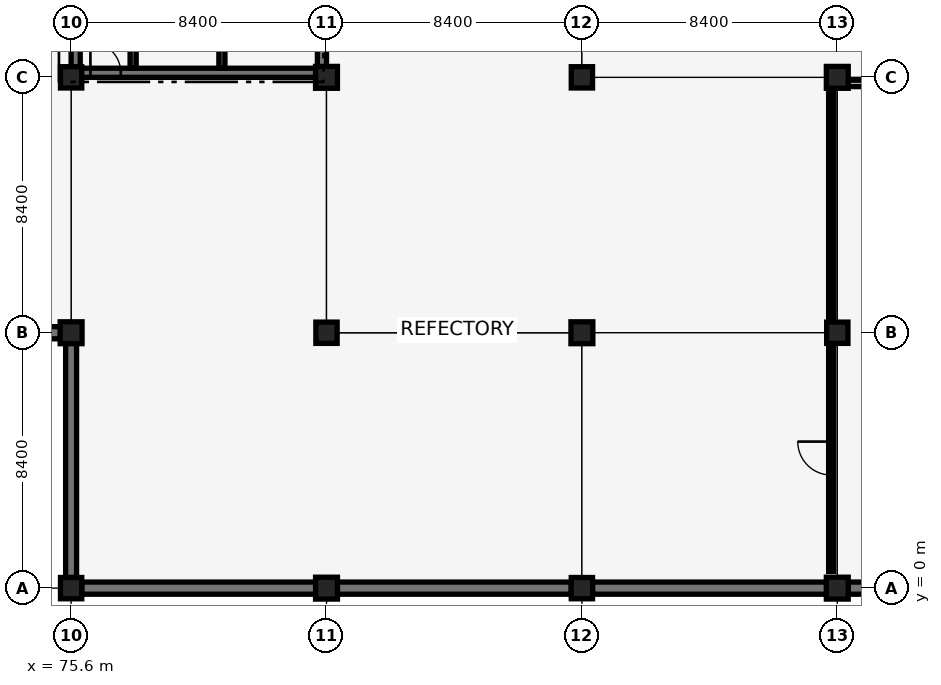
"""IFC4 building model, lengths in metres.
Left out: names, types, materials, properties, quantities, classifications, styles, units other than length and angle.
Written with IfcOpenShell. Run it as: python <this file> out.ifc"""

import sys

from ifc_helpers import new_model, si_unit, direction, frame, frame_2d, origin, origin_2d, place, context, subcontext, project, spatial, rectangle, extrude, element, fill, save


model = new_model("IFC4")
c1 = context("Model", 3, precision=1e-05, world=origin(), true_north=direction((0.0, 1.0)))
c2 = subcontext(c1, "Body", "Model", "MODEL_VIEW")
j1 = project(units=[si_unit("LENGTHUNIT", "METRE"), si_unit("PLANEANGLEUNIT", "RADIAN")], contexts=[c1])
p1 = place(None, origin())
s1 = spatial("IfcSite", under=j1, at=p1, CompositionType="ELEMENT")
p2 = place(p1, origin())
s2 = spatial("IfcBuilding", under=s1, at=p2, CompositionType="ELEMENT")
p3 = place(p2, frame((0.0, 0.0, -4.42)))
s3 = spatial("IfcBuildingStorey", under=s2, at=p3, CompositionType="ELEMENT", Elevation=-4.42)
for number, where, z_axis, x_axis in (
    (1, (67.55, 8.4, 0.0), (0.0, 0.0, 1.0), (1.0, 0.0, 0.0)),
    (2, (75.95, 0.0, 0.0), (0.0, 0.0, 1.0), (1.0, 0.0, 0.0)),
):
    element("IfcWall", number, at=place(p3, frame(where, z_axis=z_axis, x_axis=x_axis)), inside=s3, PredefinedType="USERDEFINED", context=c2, shape_type="SweptSolid", body=[
        extrude(rectangle(XDim=7.7, YDim=0.4, at=frame_2d((3.85, 0.0))), origin(), (0.0, 0.0, 1.0), 4.12),
    ])
p4 = place(p3, frame((75.6, 0.35, 0.0), z_axis=(0.0, 0.0, 1.0), x_axis=(0.0, 1.0, 0.0)))
e3 = element("IfcWall", 3, at=p4, inside=s3, PredefinedType="USERDEFINED", context=c2, shape_type="SweptSolid", body=[
    extrude(rectangle(XDim=7.7, YDim=0.36, at=frame_2d((3.85, 0.0))), origin(), (0.0, 0.0, 1.0), 4.12),
])
for number, where, z_axis, x_axis in (
    (4, (84.35, 0.0, 0.0), (0.0, 0.0, 1.0), (1.0, 0.0, 0.0)),
    (5, (92.75, 0.0, 0.0), (0.0, 0.0, 1.0), (1.0, 0.0, 0.0)),
):
    element("IfcWall", number, at=place(p3, frame(where, z_axis=z_axis, x_axis=x_axis)), inside=s3, PredefinedType="USERDEFINED", context=c2, shape_type="SweptSolid", body=[
        extrude(rectangle(XDim=7.7, YDim=0.4, at=frame_2d((3.85, 0.0))), origin(), (0.0, 0.0, 1.0), 4.12),
    ])
p5 = place(p3, frame((101.15, 0.0, 0.0), z_axis=(0.0, 0.0, 1.0), x_axis=(1.0, 0.0, 0.0)))
e6 = element("IfcWall", 6, at=p5, inside=s3, PredefinedType="USERDEFINED", context=c2, shape_type="SweptSolid", body=[
    extrude(rectangle(XDim=7.7, YDim=0.4, at=frame_2d((3.85, 0.0))), origin(), (0.0, 0.0, 1.0), 4.12),
])
p6 = place(p3, frame((75.75, 16.95, 0.0), z_axis=(0.0, 0.0, 1.0), x_axis=(1.0, 0.0, 0.0)))
e7 = element("IfcWall", 7, at=p6, inside=s3, PredefinedType="SHEAR", context=c2, shape_type="SweptSolid", body=[
    extrude(rectangle(XDim=8.1, YDim=0.3, at=frame_2d((4.05, 0.0))), origin(), (0.0, 0.0, 1.0), 4.12),
])
p7 = place(p6, frame((0.485, 0.0, 0.0)))
e8 = element("IfcOpeningElement", 8, at=p7, cuts=e7, PredefinedType="OPENING", context=c2, shape_type="SweptSolid", body=[
    extrude(rectangle(XDim=1.0, YDim=2.15, at=frame_2d((0.5, 1.075))), frame((0.0, 0.16, 0.0), z_axis=(0.0, -1.0, 0.0), x_axis=(1.0, 0.0, 0.0)), (0.0, 0.0, 1.0), 0.32),
])
p8 = place(p3, frame((75.75, 16.95, 0.0), z_axis=(0.0, 0.0, 1.0), x_axis=(0.0, 1.0, 0.0)))
e9 = element("IfcWall", 9, at=p8, inside=s3, PredefinedType="SHEAR", context=c2, shape_type="SweptSolid", body=[
    extrude(rectangle(XDim=8.1, YDim=0.3, at=frame_2d((4.05, 0.0))), origin(), (0.0, 0.0, 1.0), 4.12),
])
p9 = place(p3, frame((83.85, 16.95, 0.0), z_axis=(0.0, 0.0, 1.0), x_axis=(0.0, 1.0, 0.0)))
e10 = element("IfcWall", 10, at=p9, inside=s3, PredefinedType="SHEAR", context=c2, shape_type="SweptSolid", body=[
    extrude(rectangle(XDim=8.1, YDim=0.3, at=frame_2d((4.05, 0.0))), origin(), (0.0, 0.0, 1.0), 4.12),
])
p10 = place(p9, frame((1.325, 0.0, 0.0)))
e11 = element("IfcOpeningElement", 11, at=p10, cuts=e10, PredefinedType="OPENING", context=c2, shape_type="SweptSolid", body=[
    extrude(rectangle(XDim=1.45, YDim=2.15, at=frame_2d((0.725, 1.075))), frame((0.0, 0.16, 0.0), z_axis=(0.0, -1.0, 0.0), x_axis=(1.0, 0.0, 0.0)), (0.0, 0.0, 1.0), 0.32),
])
p11 = place(p3, frame((75.6, 0.0, -0.4), z_axis=(0.0, 0.0, 1.0), x_axis=(1.0, 0.0, 0.0)))
e12 = element("IfcColumn", 12, at=p11, inside=s3, PredefinedType="COLUMN", context=c2, shape_type="SweptSolid", body=[
    extrude(rectangle(XDim=0.7, YDim=0.7, at=origin_2d()), origin(), (0.0, 0.0, 1.0), 4.52),
])
p12 = place(p3, frame((75.6, 8.4, -0.4), z_axis=(0.0, 0.0, 1.0), x_axis=(1.0, 0.0, 0.0)))
e13 = element("IfcColumn", 13, at=p12, inside=s3, PredefinedType="COLUMN", context=c2, shape_type="SweptSolid", body=[
    extrude(rectangle(XDim=0.72, YDim=0.72, at=origin_2d()), origin(), (0.0, 0.0, 1.0), 4.52),
])
p13 = place(p3, frame((75.6, 16.8, -0.4), z_axis=(0.0, 0.0, 1.0), x_axis=(1.0, 0.0, 0.0)))
e14 = element("IfcColumn", 14, at=p13, inside=s3, PredefinedType="COLUMN", context=c2, shape_type="SweptSolid", body=[
    extrude(rectangle(XDim=0.7, YDim=0.7, at=origin_2d()), origin(), (0.0, 0.0, 1.0), 4.52),
])
p14 = place(p3, frame((84.0, 0.0, -0.4), z_axis=(0.0, 0.0, 1.0), x_axis=(1.0, 0.0, 0.0)))
e15 = element("IfcColumn", 15, at=p14, inside=s3, PredefinedType="COLUMN", context=c2, shape_type="SweptSolid", body=[
    extrude(rectangle(XDim=0.72, YDim=0.72, at=origin_2d()), origin(), (0.0, 0.0, 1.0), 4.52),
])
p15 = place(p3, frame((84.0, 8.4, -0.4), z_axis=(0.0, 0.0, 1.0), x_axis=(1.0, 0.0, 0.0)))
e16 = element("IfcColumn", 16, at=p15, inside=s3, PredefinedType="COLUMN", context=c2, shape_type="SweptSolid", body=[
    extrude(rectangle(XDim=0.7, YDim=0.7, at=origin_2d()), origin(), (0.0, 0.0, 1.0), 4.52),
])
p16 = place(p3, frame((84.0, 16.8, -0.4), z_axis=(0.0, 0.0, 1.0), x_axis=(1.0, 0.0, 0.0)))
e17 = element("IfcColumn", 17, at=p16, inside=s3, PredefinedType="COLUMN", context=c2, shape_type="SweptSolid", body=[
    extrude(rectangle(XDim=0.72, YDim=0.72, at=origin_2d()), origin(), (0.0, 0.0, 1.0), 4.52),
])
p17 = place(p3, frame((92.4, 0.0, -0.4), z_axis=(0.0, 0.0, 1.0), x_axis=(1.0, 0.0, 0.0)))
e18 = element("IfcColumn", 18, at=p17, inside=s3, PredefinedType="COLUMN", context=c2, shape_type="SweptSolid", body=[
    extrude(rectangle(XDim=0.7, YDim=0.7, at=origin_2d()), origin(), (0.0, 0.0, 1.0), 4.52),
])
p18 = place(p3, frame((92.4, 8.4, -0.4), z_axis=(0.0, 0.0, 1.0), x_axis=(1.0, 0.0, 0.0)))
e19 = element("IfcColumn", 19, at=p18, inside=s3, PredefinedType="COLUMN", context=c2, shape_type="SweptSolid", body=[
    extrude(rectangle(XDim=0.72, YDim=0.72, at=origin_2d()), origin(), (0.0, 0.0, 1.0), 4.52),
])
p19 = place(p3, frame((92.4, 16.8, -0.4), z_axis=(0.0, 0.0, 1.0), x_axis=(1.0, 0.0, 0.0)))
e20 = element("IfcColumn", 20, at=p19, inside=s3, PredefinedType="COLUMN", context=c2, shape_type="SweptSolid", body=[
    extrude(rectangle(XDim=0.7, YDim=0.7, at=origin_2d()), origin(), (0.0, 0.0, 1.0), 4.52),
])
p20 = place(p3, frame((100.8, 0.0, -0.4), z_axis=(0.0, 0.0, 1.0), x_axis=(1.0, 0.0, 0.0)))
e21 = element("IfcColumn", 21, at=p20, inside=s3, PredefinedType="COLUMN", context=c2, shape_type="SweptSolid", body=[
    extrude(rectangle(XDim=0.72, YDim=0.72, at=origin_2d()), origin(), (0.0, 0.0, 1.0), 4.52),
])
p21 = place(p3, frame((100.8, 8.4, -0.4), z_axis=(0.0, 0.0, 1.0), x_axis=(1.0, 0.0, 0.0)))
e22 = element("IfcColumn", 22, at=p21, inside=s3, PredefinedType="COLUMN", context=c2, shape_type="SweptSolid", body=[
    extrude(rectangle(XDim=0.7, YDim=0.7, at=origin_2d()), origin(), (0.0, 0.0, 1.0), 4.52),
])
p22 = place(p3, frame((100.8, 16.8, -0.4), z_axis=(0.0, 0.0, 1.0), x_axis=(1.0, 0.0, 0.0)))
e23 = element("IfcColumn", 23, at=p22, inside=s3, PredefinedType="COLUMN", context=c2, shape_type="SweptSolid", body=[
    extrude(rectangle(XDim=0.72, YDim=0.72, at=origin_2d()), origin(), (0.0, 0.0, 1.0), 4.52),
])
p23 = place(p3, frame((80.56, 17.1, 0.0), z_axis=(0.0, 0.0, 1.0), x_axis=(0.0, 1.0, 0.0)))
e24 = element("IfcWall", 24, at=p23, inside=s3, PredefinedType="SHEAR", context=c2, shape_type="SweptSolid", body=[
    extrude(rectangle(XDim=3.8, YDim=0.2, at=frame_2d((1.9, 0.0))), origin(), (0.0, 0.0, 1.0), 3.24),
])
p24 = place(p23, frame((1.35, 0.0, 0.0)))
e25 = element("IfcOpeningElement", 25, at=p24, cuts=e24, PredefinedType="OPENING", context=c2, shape_type="SweptSolid", body=[
    extrude(rectangle(XDim=1.1, YDim=2.15, at=frame_2d((0.55, 1.075))), frame((0.0, 0.11, 0.0), z_axis=(0.0, -1.0, 0.0), x_axis=(1.0, 0.0, 0.0)), (0.0, 0.0, 1.0), 0.22),
])
p25 = place(p3, frame((77.64, 17.1, 0.0), z_axis=(0.0, 0.0, 1.0), x_axis=(0.0, 1.0, 0.0)))
e26 = element("IfcWall", 26, at=p25, inside=s3, PredefinedType="SHEAR", context=c2, shape_type="SweptSolid", body=[
    extrude(rectangle(XDim=3.8, YDim=0.2, at=frame_2d((1.9, 0.0))), origin(), (0.0, 0.0, 1.0), 3.24),
])
p26 = place(p3, frame((100.6, 0.55, 0.0), z_axis=(0.0, 0.0, 1.0), x_axis=(0.0, 1.0, 0.0)))
e27 = element("IfcWall", 27, at=p26, inside=s3, PredefinedType="PARTITIONING", context=c2, shape_type="SweptSolid", body=[
    extrude(rectangle(XDim=7.44, YDim=0.17, at=frame_2d((3.72, 0.0))), origin(), (0.0, 0.0, 1.0), 3.32),
])
p27 = place(p26, frame((3.17, 0.0, 0.0)))
e28 = element("IfcOpeningElement", 28, at=p27, cuts=e27, PredefinedType="OPENING", context=c2, shape_type="SweptSolid", body=[
    extrude(rectangle(XDim=1.1, YDim=2.15, at=frame_2d((0.55, 1.075))), frame((0.0, 0.095, 0.0), z_axis=(0.0, -1.0, 0.0), x_axis=(1.0, 0.0, 0.0)), (0.0, 0.0, 1.0), 0.19),
])
p28 = place(p3, frame((100.6, 8.81, 0.0), z_axis=(0.0, 0.0, 1.0), x_axis=(0.0, 1.0, 0.0)))
e29 = element("IfcWall", 29, at=p28, inside=s3, PredefinedType="PARTITIONING", context=c2, shape_type="SweptSolid", body=[
    extrude(rectangle(XDim=7.64, YDim=0.17, at=frame_2d((3.82, 0.0))), origin(), (0.0, 0.0, 1.0), 3.24),
])
p29 = place(p3, frame((101.15, 16.6, 0.0), z_axis=(0.0, 0.0, 1.0), x_axis=(1.0, 0.0, 0.0)))
e30 = element("IfcWall", 30, at=p29, inside=s3, PredefinedType="PARTITIONING", context=c2, shape_type="SweptSolid", body=[
    extrude(rectangle(XDim=7.64, YDim=0.21, at=frame_2d((3.82, 0.0))), origin(), (0.0, 0.0, 1.0), 3.24),
])
p30 = place(p29, frame((3.12, 0.0, 0.0)))
e31 = element("IfcOpeningElement", 31, at=p30, cuts=e30, PredefinedType="OPENING", context=c2, shape_type="SweptSolid", body=[
    extrude(rectangle(XDim=1.4, YDim=2.2, at=frame_2d((0.7, 1.1))), frame((0.0, 0.115, 0.0), z_axis=(0.0, -1.0, 0.0), x_axis=(1.0, 0.0, 0.0)), (0.0, 0.0, 1.0), 0.23),
])
p31 = place(p7, origin())
e32 = element("IfcDoor", 32, at=p31, inside=s3, OperationType="SINGLE_SWING_LEFT", PredefinedType="DOOR", context=c2, shape_type="SweptSolid", body=[
    extrude(rectangle(XDim=1.0, YDim=2.15, at=frame_2d((0.5, 1.075))), frame((0.0, 0.025, 0.0), z_axis=(0.0, -1.0, 0.0), x_axis=(1.0, 0.0, 0.0)), (0.0, 0.0, 1.0), 0.05),
])
fill(e8, e32)
p32 = place(p27, origin())
e33 = element("IfcDoor", 33, at=p32, inside=s3, OperationType="SINGLE_SWING_RIGHT", PredefinedType="DOOR", context=c2, shape_type="SweptSolid", body=[
    extrude(rectangle(XDim=1.1, YDim=2.15, at=frame_2d((0.55, 1.075))), frame((0.0, 0.025, 0.0), z_axis=(0.0, -1.0, 0.0), x_axis=(1.0, 0.0, 0.0)), (0.0, 0.0, 1.0), 0.05),
])
fill(e28, e33)
save(model, sys.argv[1])
